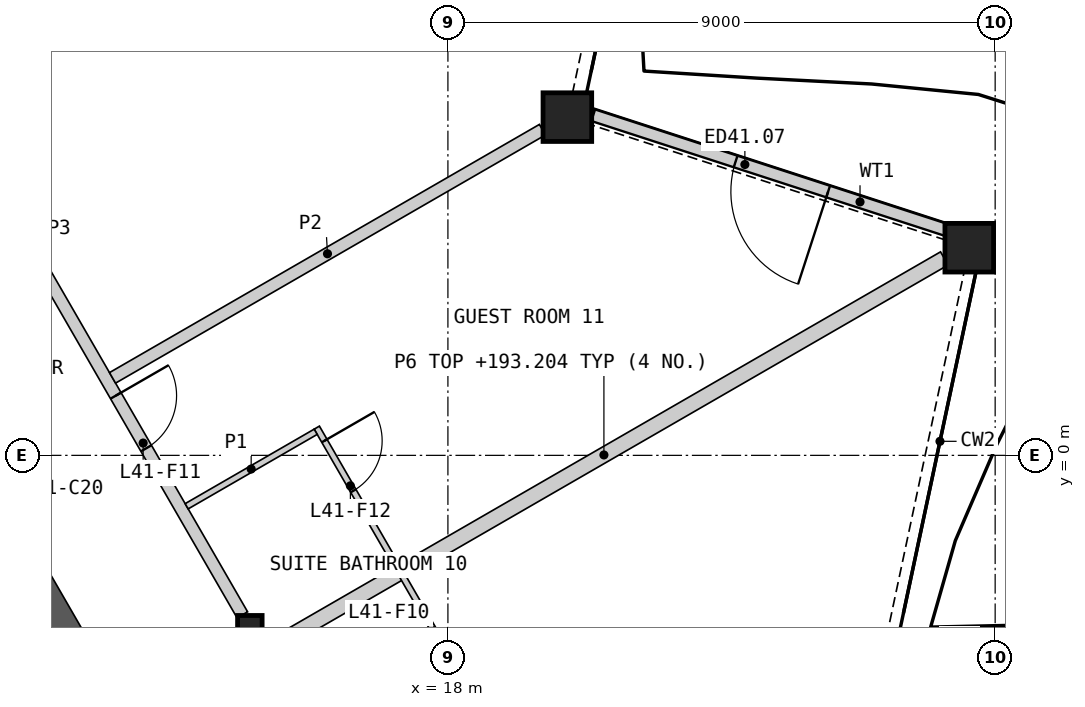
"""IFC4 building model, lengths in metres.
Left out: names, types, materials, properties, quantities, classifications, styles, units other than length and angle.
Written with IfcOpenShell. Run it as: python <this file> out.ifc"""

import sys

from ifc_helpers import new_model, si_unit, direction, frame, frame_2d, origin, origin_2d, place, context, subcontext, project, spatial, rectangle, hollow_rectangle, i_section, extrude, element, fill, save


model = new_model("IFC4")
c1 = context("Model", 3, precision=1e-05, world=origin(), true_north=direction((0.0, 1.0)))
c2 = subcontext(c1, "Body", "Model", "MODEL_VIEW")
j1 = project(units=[si_unit("LENGTHUNIT", "METRE"), si_unit("PLANEANGLEUNIT", "RADIAN")], contexts=[c1])
p1 = place(None, origin())
s1 = spatial("IfcSite", under=j1, at=p1, CompositionType="ELEMENT")
p2 = place(p1, origin())
s2 = spatial("IfcBuilding", under=s1, at=p2, CompositionType="ELEMENT")
p3 = place(p2, frame((0.0, 0.0, 190.8)))
s3 = spatial("IfcBuildingStorey", under=s2, at=p3, CompositionType="ELEMENT", Elevation=190.8)
for number, where, z_axis, x_axis in (
    (1, (26.574, 3.415, 0.0), (0.0, 0.0, 1.0), (1.0, 0.0, 0.0)),
    (2, (19.965, 5.563, 0.0), (0.0, 0.0, 1.0), (1.0, 0.0, 0.0)),
):
    element("IfcColumn", number, at=place(p3, frame(where, z_axis=z_axis, x_axis=x_axis)), inside=s3, PredefinedType="COLUMN", context=c2, shape_type="SweptSolid", body=[
        extrude(hollow_rectangle(XDim=0.8, YDim=0.8, WallThickness=0.05, at=origin_2d()), origin(), (0.0, 0.0, 1.0), 3.6),
    ])
p4 = place(p3, frame((14.743, -2.837, 0.0), z_axis=(0.0, 0.0, 1.0), x_axis=(1.0, 0.0, 0.0)))
e3 = element("IfcColumn", 3, at=p4, inside=s3, PredefinedType="COLUMN", context=c2, shape_type="SweptSolid", body=[
    extrude(i_section(OverallWidth=0.404, OverallDepth=0.407, WebThickness=0.027, FlangeThickness=0.044, at=origin_2d()), origin(), (0.0, 0.0, 1.0), 3.6),
])
p5 = place(p3, frame((26.24, 3.693, 0.0), z_axis=(0.0, 0.0, 1.0), x_axis=(-0.951053023356, 0.30902774433, 0.0)))
e4 = element("IfcWall", 4, at=p5, inside=s3, PredefinedType="SOLIDWALL", context=c2, shape_type="SweptSolid", body=[
    extrude(rectangle(XDim=6.152, YDim=0.2, at=frame_2d((3.076, 0.0))), origin(), (0.0, 0.0, 1.0), 2.701),
])
p6 = place(p5, frame((2.089, 0.0, 0.0)))
e5 = element("IfcOpeningElement", 5, at=p6, cuts=e4, PredefinedType="OPENING", context=c2, shape_type="SweptSolid", body=[
    extrude(rectangle(XDim=1.6, YDim=2.4, at=frame_2d((0.8, 1.2))), frame((0.0, 0.11, 0.0), z_axis=(0.0, -1.0, 0.0), x_axis=(1.0, 0.0, 0.0)), (0.0, 0.0, 1.0), 0.22),
])
p7 = place(p3, frame((14.526, -8.011, 0.0), z_axis=(0.0, 0.0, 1.0), x_axis=(-0.499982018922, 0.866035784916, 0.0)))
e6 = element("IfcWall", 6, at=p7, inside=s3, PredefinedType="SHEAR", context=c2, shape_type="SweptSolid", body=[
    extrude(rectangle(XDim=6.785, YDim=0.75, at=frame_2d((3.393, 0.0))), origin(), (0.0, 0.0, 1.0), 3.25),
])
p8 = place(p3, frame((14.967, -3.226, 0.0), z_axis=(0.0, 0.0, 1.0), x_axis=(0.866030250269, 0.499991605548, 0.0)))
e7 = element("IfcWall", 7, at=p8, inside=s3, PredefinedType="PARTITIONING", context=c2, shape_type="SweptSolid", body=[
    extrude(rectangle(XDim=12.929, YDim=0.25, at=frame_2d((6.465, 0.0))), origin(), (0.0, 0.0, 1.0), 2.404),
])
p9 = place(p3, frame((9.952, 5.461, 0.0), z_axis=(0.0, 0.0, 1.0), x_axis=(0.50000393355, -0.866023132736, 0.0)))
e8 = element("IfcWall", 8, at=p9, inside=s3, PredefinedType="PARTITIONING", context=c2, shape_type="SweptSolid", body=[
    extrude(rectangle(XDim=9.335, YDim=0.2, at=frame_2d((4.667, 0.0))), origin(), (0.0, 0.0, 1.0), 3.25),
])
p10 = place(p9, frame((5.172, 0.0, 0.0)))
e9 = element("IfcOpeningElement", 9, at=p10, cuts=e8, PredefinedType="OPENING", context=c2, shape_type="SweptSolid", body=[
    extrude(rectangle(XDim=1.0, YDim=2.1, at=frame_2d((0.5, 1.05))), frame((0.0, 0.11, 0.0), z_axis=(0.0, -1.0, 0.0), x_axis=(1.0, 0.0, 0.0)), (0.0, 0.0, 1.0), 0.22),
])
p11 = place(p3, frame((12.484, 1.274, 0.0), z_axis=(0.0, 0.0, 1.0), x_axis=(0.866026229868, 0.499998569178, 0.0)))
e10 = element("IfcWall", 10, at=p11, inside=s3, PredefinedType="PARTITIONING", context=c2, shape_type="SweptSolid", body=[
    extrude(rectangle(XDim=8.164, YDim=0.2, at=frame_2d((4.082, 0.0))), origin(), (0.0, 0.0, 1.0), 2.404),
])
p12 = place(p3, frame((15.844, 0.456, 0.0), z_axis=(0.0, 0.0, 1.0), x_axis=(0.500006934395, -0.866021400173, 0.0)))
e11 = element("IfcWall", 11, at=p12, inside=s3, PredefinedType="PARTITIONING", context=c2, shape_type="SweptSolid", body=[
    extrude(rectangle(XDim=5.2, YDim=0.1, at=frame_2d((2.6, 0.0))), origin(), (0.0, 0.0, 1.0), 2.404),
])
p13 = place(p12, frame((4.0, 0.0, 0.0)))
e12 = element("IfcOpeningElement", 12, at=p13, cuts=e11, PredefinedType="OPENING", context=c2, shape_type="SweptSolid", body=[
    extrude(rectangle(XDim=0.95, YDim=2.1, at=frame_2d((0.475, 1.05))), frame((0.0, 0.06, 0.0), z_axis=(0.0, -1.0, 0.0), x_axis=(1.0, 0.0, 0.0)), (0.0, 0.0, 1.0), 0.12),
])
p14 = place(p12, frame((0.25, 0.0, 0.0)))
e13 = element("IfcOpeningElement", 13, at=p14, cuts=e11, PredefinedType="OPENING", context=c2, shape_type="SweptSolid", body=[
    extrude(rectangle(XDim=0.95, YDim=2.1, at=frame_2d((0.475, 1.05))), frame((0.0, 0.06, 0.0), z_axis=(0.0, -1.0, 0.0), x_axis=(1.0, 0.0, 0.0)), (0.0, 0.0, 1.0), 0.12),
])
p15 = place(p3, frame((13.704, -0.837, 0.0), z_axis=(0.0, 0.0, 1.0), x_axis=(0.865989751695, 0.500061746146, 0.0)))
e14 = element("IfcWall", 14, at=p15, inside=s3, PredefinedType="PARTITIONING", context=c2, shape_type="SweptSolid", body=[
    extrude(rectangle(XDim=2.45, YDim=0.1, at=frame_2d((1.225, 0.0))), origin(), (0.0, 0.0, 1.0), 2.404),
])
p16 = place(p6, origin())
e15 = element("IfcDoor", 15, at=p16, inside=s3, OperationType="DOUBLE_DOOR_SINGLE_SWING", PredefinedType="DOOR", context=c2, shape_type="SweptSolid", body=[
    extrude(rectangle(XDim=1.6, YDim=2.4, at=frame_2d((0.8, 1.2))), frame((0.0, 0.025, 0.0), z_axis=(0.0, -1.0, 0.0), x_axis=(1.0, 0.0, 0.0)), (0.0, 0.0, 1.0), 0.05),
])
fill(e5, e15)
p17 = place(p10, origin())
e16 = element("IfcDoor", 16, at=p17, inside=s3, OperationType="SINGLE_SWING_LEFT", PredefinedType="DOOR", context=c2, shape_type="SweptSolid", body=[
    extrude(rectangle(XDim=1.0, YDim=2.1, at=frame_2d((0.5, 1.05))), frame((0.0, 0.025, 0.0), z_axis=(0.0, -1.0, 0.0), x_axis=(1.0, 0.0, 0.0)), (0.0, 0.0, 1.0), 0.05),
])
fill(e9, e16)
p18 = place(p14, origin())
e17 = element("IfcDoor", 17, at=p18, inside=s3, OperationType="SINGLE_SWING_LEFT", PredefinedType="DOOR", context=c2, shape_type="SweptSolid", body=[
    extrude(rectangle(XDim=0.95, YDim=2.1, at=frame_2d((0.475, 1.05))), frame((0.0, 0.025, 0.0), z_axis=(0.0, -1.0, 0.0), x_axis=(1.0, 0.0, 0.0)), (0.0, 0.0, 1.0), 0.05),
])
fill(e13, e17)
save(model, sys.argv[1])
